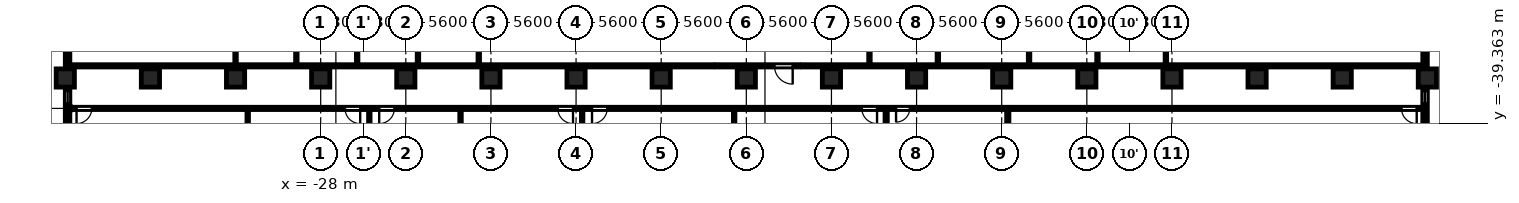
"""IFC4 building model, lengths in metres.
Left out: names, types, materials, properties, quantities, classifications, styles, units other than length and angle.
Written with IfcOpenShell. Run it as: python <this file> out.ifc"""

import sys

from ifc_helpers import new_model, si_unit, direction, frame, frame_2d, origin, origin_2d, place, context, subcontext, project, spatial, rectangle, circle, extrude, element, fill, save


model = new_model("IFC4")
c1 = context("Model", 3, precision=1e-05, world=origin(), true_north=direction((0.0, 1.0)))
c2 = subcontext(c1, "Body", "Model", "MODEL_VIEW")
j1 = project(units=[si_unit("LENGTHUNIT", "METRE"), si_unit("PLANEANGLEUNIT", "RADIAN")], contexts=[c1])
p1 = place(None, origin())
s1 = spatial("IfcSite", under=j1, at=p1, CompositionType="ELEMENT")
p2 = place(p1, origin())
s2 = spatial("IfcBuilding", under=s1, at=p2, CompositionType="ELEMENT")
p3 = place(p2, frame((0.0, 0.0, 6.5)))
s3 = spatial("IfcBuildingStorey", under=s2, at=p3, CompositionType="ELEMENT", Elevation=6.5)
for number, where, z_axis, x_axis in (
    (1, (-44.8, -36.4, 0.0), (0.0, 0.0, 1.0), (1.0, 0.0, 0.0)),
    (2, (-39.2, -36.4, 0.0), (0.0, 0.0, 1.0), (1.0, 0.0, 0.0)),
    (3, (-33.6, -36.4, 0.0), (0.0, 0.0, 1.0), (1.0, 0.0, 0.0)),
    (4, (-28.0, -36.4, 0.0), (0.0, 0.0, 1.0), (1.0, 0.0, 0.0)),
    (5, (-22.4, -36.4, 0.0), (0.0, 0.0, 1.0), (1.0, 0.0, 0.0)),
    (6, (-16.8, -36.4, 0.0), (0.0, 0.0, 1.0), (1.0, 0.0, 0.0)),
    (7, (-11.2, -36.4, 0.0), (0.0, 0.0, 1.0), (1.0, 0.0, 0.0)),
    (8, (-5.6, -36.4, 0.0), (0.0, 0.0, 1.0), (1.0, 0.0, 0.0)),
    (9, (0.0, -36.4, 0.0), (0.0, 0.0, 1.0), (1.0, 0.0, 0.0)),
    (10, (5.6, -36.4, 0.0), (0.0, 0.0, 1.0), (1.0, 0.0, 0.0)),
    (11, (11.2, -36.4, 0.0), (0.0, 0.0, 1.0), (1.0, 0.0, 0.0)),
    (12, (16.8, -36.4, 0.0), (0.0, 0.0, 1.0), (1.0, 0.0, 0.0)),
    (13, (22.4, -36.4, 0.0), (0.0, 0.0, 1.0), (1.0, 0.0, 0.0)),
    (14, (28.0, -36.4, 0.0), (0.0, 0.0, 1.0), (1.0, 0.0, 0.0)),
    (15, (33.6, -36.4, 0.0), (0.0, 0.0, 1.0), (1.0, 0.0, 0.0)),
    (16, (39.2, -36.4, 0.0), (0.0, 0.0, 1.0), (1.0, 0.0, 0.0)),
    (17, (44.8, -36.4, 0.0), (0.0, 0.0, 1.0), (1.0, 0.0, 0.0)),
):
    element("IfcColumn", number, at=place(p3, frame(where, z_axis=z_axis, x_axis=x_axis)), inside=s3, PredefinedType="COLUMN", context=c2, shape_type="SweptSolid", body=[
        extrude(circle(Radius=0.6, at=origin_2d()), origin(), (0.0, 0.0, 1.0), 4.8),
    ])
p4 = place(p3, frame((44.65, -42.8, 0.0), z_axis=(0.0, 0.0, 1.0), x_axis=(0.0, 1.0, 0.0)))
e18 = element("IfcWall", 18, at=p4, inside=s3, PredefinedType="SOLIDWALL", context=c2, shape_type="SweptSolid", body=[
    extrude(rectangle(XDim=5.8, YDim=0.3, at=frame_2d((2.9, 0.0))), origin(), (0.0, 0.0, 1.0), 3.65),
])
p5 = place(p4, frame((1.262, 0.0, 0.9)))
e19 = element("IfcOpeningElement", 19, at=p5, cuts=e18, PredefinedType="OPENING", context=c2, shape_type="SweptSolid", body=[
    extrude(rectangle(XDim=1.8, YDim=1.25, at=frame_2d((0.9, 0.625))), frame((0.0, 0.16, 0.0), z_axis=(0.0, -1.0, 0.0), x_axis=(1.0, 0.0, 0.0)), (0.0, 0.0, 1.0), 0.32),
])
p6 = place(p4, frame((4.738, 0.0, 0.6)))
e20 = element("IfcOpeningElement", 20, at=p6, cuts=e18, PredefinedType="OPENING", context=c2, shape_type="SweptSolid", body=[
    extrude(rectangle(XDim=0.8, YDim=1.55, at=frame_2d((0.4, 0.775))), frame((0.0, 0.16, 0.0), z_axis=(0.0, -1.0, 0.0), x_axis=(1.0, 0.0, 0.0)), (0.0, 0.0, 1.0), 0.32),
])
p7 = place(p3, frame((44.65, -35.8, 0.0), z_axis=(0.0, 0.0, 1.0), x_axis=(0.0, 1.0, 0.0)))
e21 = element("IfcWall", 21, at=p7, inside=s3, PredefinedType="SOLIDWALL", context=c2, shape_type="SweptSolid", body=[
    extrude(rectangle(XDim=5.8, YDim=0.3, at=frame_2d((2.9, 0.0))), origin(), (0.0, 0.0, 1.0), 3.65),
])
p8 = place(p7, frame((2.137, 0.0, 0.9)))
e22 = element("IfcOpeningElement", 22, at=p8, cuts=e21, PredefinedType="OPENING", context=c2, shape_type="SweptSolid", body=[
    extrude(rectangle(XDim=1.8, YDim=1.25, at=frame_2d((0.9, 0.625))), frame((0.0, 0.16, 0.0), z_axis=(0.0, -1.0, 0.0), x_axis=(1.0, 0.0, 0.0)), (0.0, 0.0, 1.0), 0.32),
])
p9 = place(p3, frame((-44.65, -30.0, 0.0), z_axis=(0.0, 0.0, 1.0), x_axis=(0.0, -1.0, 0.0)))
e23 = element("IfcWall", 23, at=p9, inside=s3, PredefinedType="SOLIDWALL", context=c2, shape_type="SweptSolid", body=[
    extrude(rectangle(XDim=5.8, YDim=0.3, at=frame_2d((2.9, 0.0))), origin(), (0.0, 0.0, 1.0), 3.65),
])
p10 = place(p9, frame((1.863, 0.0, 0.9)))
e24 = element("IfcOpeningElement", 24, at=p10, cuts=e23, PredefinedType="OPENING", context=c2, shape_type="SweptSolid", body=[
    extrude(rectangle(XDim=1.8, YDim=1.25, at=frame_2d((0.9, 0.625))), frame((0.0, 0.16, 0.0), z_axis=(0.0, -1.0, 0.0), x_axis=(1.0, 0.0, 0.0)), (0.0, 0.0, 1.0), 0.32),
])
p11 = place(p3, frame((-44.65, -37.0, 0.0), z_axis=(0.0, 0.0, 1.0), x_axis=(0.0, -1.0, 0.0)))
e25 = element("IfcWall", 25, at=p11, inside=s3, PredefinedType="SOLIDWALL", context=c2, shape_type="SweptSolid", body=[
    extrude(rectangle(XDim=5.8, YDim=0.3, at=frame_2d((2.9, 0.0))), origin(), (0.0, 0.0, 1.0), 3.65),
])
p12 = place(p11, frame((0.262, 0.0, 0.6)))
e26 = element("IfcOpeningElement", 26, at=p12, cuts=e25, PredefinedType="OPENING", context=c2, shape_type="SweptSolid", body=[
    extrude(rectangle(XDim=0.8, YDim=1.55, at=frame_2d((0.4, 0.775))), frame((0.0, 0.16, 0.0), z_axis=(0.0, -1.0, 0.0), x_axis=(1.0, 0.0, 0.0)), (0.0, 0.0, 1.0), 0.32),
])
p13 = place(p11, frame((2.738, 0.0, 0.9)))
e27 = element("IfcOpeningElement", 27, at=p13, cuts=e25, PredefinedType="OPENING", context=c2, shape_type="SweptSolid", body=[
    extrude(rectangle(XDim=1.8, YDim=1.25, at=frame_2d((0.9, 0.625))), frame((0.0, 0.16, 0.0), z_axis=(0.0, -1.0, 0.0), x_axis=(1.0, 0.0, 0.0)), (0.0, 0.0, 1.0), 0.32),
])
p14 = place(p3, frame((-44.48, -38.4, 0.0), z_axis=(0.0, 0.0, 1.0), x_axis=(1.0, 0.0, 0.0)))
e28 = element("IfcWall", 28, at=p14, inside=s3, PredefinedType="PARTITIONING", context=c2, shape_type="SweptSolid", body=[
    extrude(rectangle(XDim=88.96, YDim=0.15, at=frame_2d((44.48, 0.0))), origin(), (0.0, 0.0, 1.0), 4.45),
])
p15 = place(p14, frame((0.42, 0.0, 0.0)))
e29 = element("IfcOpeningElement", 29, at=p15, cuts=e28, PredefinedType="OPENING", context=c2, shape_type="SweptSolid", body=[
    extrude(rectangle(XDim=1.0, YDim=2.1, at=frame_2d((0.5, 1.05))), frame((0.0, 0.085, 0.0), z_axis=(0.0, -1.0, 0.0), x_axis=(1.0, 0.0, 0.0)), (0.0, 0.0, 1.0), 0.17),
])
p16 = place(p14, frame((18.08, 0.0, 0.0)))
e30 = element("IfcOpeningElement", 30, at=p16, cuts=e28, PredefinedType="OPENING", context=c2, shape_type="SweptSolid", body=[
    extrude(rectangle(XDim=1.0, YDim=2.1, at=frame_2d((0.5, 1.05))), frame((0.0, 0.085, 0.0), z_axis=(0.0, -1.0, 0.0), x_axis=(1.0, 0.0, 0.0)), (0.0, 0.0, 1.0), 0.17),
])
p17 = place(p14, frame((20.33, 0.0, 0.0)))
e31 = element("IfcOpeningElement", 31, at=p17, cuts=e28, PredefinedType="OPENING", context=c2, shape_type="SweptSolid", body=[
    extrude(rectangle(XDim=1.0, YDim=2.1, at=frame_2d((0.5, 1.05))), frame((0.0, 0.085, 0.0), z_axis=(0.0, -1.0, 0.0), x_axis=(1.0, 0.0, 0.0)), (0.0, 0.0, 1.0), 0.17),
])
p18 = place(p14, frame((32.08, 0.0, 0.0)))
e32 = element("IfcOpeningElement", 32, at=p18, cuts=e28, PredefinedType="OPENING", context=c2, shape_type="SweptSolid", body=[
    extrude(rectangle(XDim=1.0, YDim=2.1, at=frame_2d((0.5, 1.05))), frame((0.0, 0.085, 0.0), z_axis=(0.0, -1.0, 0.0), x_axis=(1.0, 0.0, 0.0)), (0.0, 0.0, 1.0), 0.17),
])
p19 = place(p14, frame((34.33, 0.0, 0.0)))
e33 = element("IfcOpeningElement", 33, at=p19, cuts=e28, PredefinedType="OPENING", context=c2, shape_type="SweptSolid", body=[
    extrude(rectangle(XDim=1.0, YDim=2.1, at=frame_2d((0.5, 1.05))), frame((0.0, 0.085, 0.0), z_axis=(0.0, -1.0, 0.0), x_axis=(1.0, 0.0, 0.0)), (0.0, 0.0, 1.0), 0.17),
])
p20 = place(p14, frame((52.08, 0.0, 0.0)))
e34 = element("IfcOpeningElement", 34, at=p20, cuts=e28, PredefinedType="OPENING", context=c2, shape_type="SweptSolid", body=[
    extrude(rectangle(XDim=1.0, YDim=2.1, at=frame_2d((0.5, 1.05))), frame((0.0, 0.085, 0.0), z_axis=(0.0, -1.0, 0.0), x_axis=(1.0, 0.0, 0.0)), (0.0, 0.0, 1.0), 0.17),
])
p21 = place(p14, frame((54.33, 0.0, 0.0)))
e35 = element("IfcOpeningElement", 35, at=p21, cuts=e28, PredefinedType="OPENING", context=c2, shape_type="SweptSolid", body=[
    extrude(rectangle(XDim=0.9, YDim=2.1, at=frame_2d((0.45, 1.05))), frame((0.0, 0.085, 0.0), z_axis=(0.0, -1.0, 0.0), x_axis=(1.0, 0.0, 0.0)), (0.0, 0.0, 1.0), 0.17),
])
p22 = place(p14, frame((87.58, 0.0, 0.0)))
e36 = element("IfcOpeningElement", 36, at=p22, cuts=e28, PredefinedType="OPENING", context=c2, shape_type="SweptSolid", body=[
    extrude(rectangle(XDim=1.0, YDim=2.1, at=frame_2d((0.5, 1.05))), frame((0.0, 0.085, 0.0), z_axis=(0.0, -1.0, 0.0), x_axis=(1.0, 0.0, 0.0)), (0.0, 0.0, 1.0), 0.17),
])
p23 = place(p3, frame((-44.48, -35.6, 0.0), z_axis=(0.0, 0.0, 1.0), x_axis=(1.0, 0.0, 0.0)))
e37 = element("IfcWall", 37, at=p23, inside=s3, PredefinedType="PARTITIONING", context=c2, shape_type="SweptSolid", body=[
    extrude(rectangle(XDim=42.38, YDim=0.15, at=frame_2d((21.19, 0.0))), origin(), (0.0, 0.0, 1.0), 4.45),
])
p24 = place(p3, frame((-2.05, -35.6, 0.0), z_axis=(0.0, 0.0, 1.0), x_axis=(1.0, 0.0, 0.0)))
e38 = element("IfcWall", 38, at=p24, inside=s3, PredefinedType="PARTITIONING", context=c2, shape_type="SweptSolid", body=[
    extrude(rectangle(XDim=5.6, YDim=0.15, at=frame_2d((2.8, 0.0))), origin(), (0.0, 0.0, 1.0), 4.45),
])
p25 = place(p24, frame((3.9, 0.0, 0.0)))
e39 = element("IfcOpeningElement", 39, at=p25, cuts=e38, PredefinedType="OPENING", context=c2, shape_type="SweptSolid", body=[
    extrude(rectangle(XDim=1.2, YDim=2.1, at=frame_2d((0.6, 1.05))), frame((0.0, 0.085, 0.0), z_axis=(0.0, -1.0, 0.0), x_axis=(1.0, 0.0, 0.0)), (0.0, 0.0, 1.0), 0.17),
])
p26 = place(p3, frame((3.6, -35.6, 0.0), z_axis=(0.0, 0.0, 1.0), x_axis=(1.0, 0.0, 0.0)))
e40 = element("IfcWall", 40, at=p26, inside=s3, PredefinedType="PARTITIONING", context=c2, shape_type="SweptSolid", body=[
    extrude(rectangle(XDim=40.88, YDim=0.15, at=frame_2d((20.44, 0.0))), origin(), (0.0, 0.0, 1.0), 4.45),
])
p27 = place(p3, frame((-33.6, -35.525, 0.0), z_axis=(0.0, 0.0, 1.0), x_axis=(0.0, 1.0, 0.0)))
e41 = element("IfcWall", 41, at=p27, inside=s3, PredefinedType="PARTITIONING", context=c2, shape_type="SweptSolid", body=[
    extrude(rectangle(XDim=10.65, YDim=0.1, at=frame_2d((5.325, 0.0))), origin(), (0.0, 0.0, 1.0), 4.45),
])
p28 = place(p3, frame((-32.8, -57.08, 0.0), z_axis=(0.0, 0.0, 1.0), x_axis=(0.0, 1.0, 0.0)))
e42 = element("IfcWall", 42, at=p28, inside=s3, PredefinedType="PARTITIONING", context=c2, shape_type="SweptSolid", body=[
    extrude(rectangle(XDim=18.605, YDim=0.1, at=frame_2d((9.302, 0.0))), origin(), (0.0, 0.0, 1.0), 4.45),
])
for number, where, z_axis, x_axis in (
    (43, (-29.6, -35.525, 0.0), (0.0, 0.0, 1.0), (0.0, 1.0, 0.0)),
    (44, (-25.6, -35.525, 0.0), (0.0, 0.0, 1.0), (0.0, 1.0, 0.0)),
):
    element("IfcWall", number, at=place(p3, frame(where, z_axis=z_axis, x_axis=x_axis)), inside=s3, PredefinedType="PARTITIONING", context=c2, shape_type="SweptSolid", body=[
        extrude(rectangle(XDim=10.65, YDim=0.1, at=frame_2d((5.325, 0.0))), origin(), (0.0, 0.0, 1.0), 4.45),
    ])
p29 = place(p3, frame((-24.8, -57.08, 0.0), z_axis=(0.0, 0.0, 1.0), x_axis=(0.0, 1.0, 0.0)))
e45 = element("IfcWall", 45, at=p29, inside=s3, PredefinedType="PARTITIONING", context=c2, shape_type="SweptSolid", body=[
    extrude(rectangle(XDim=18.605, YDim=0.1, at=frame_2d((9.302, 0.0))), origin(), (0.0, 0.0, 1.0), 4.45),
])
p30 = place(p3, frame((-21.6, -35.525, 0.0), z_axis=(0.0, 0.0, 1.0), x_axis=(0.0, 1.0, 0.0)))
e46 = element("IfcWall", 46, at=p30, inside=s3, PredefinedType="PARTITIONING", context=c2, shape_type="SweptSolid", body=[
    extrude(rectangle(XDim=10.65, YDim=0.1, at=frame_2d((5.325, 0.0))), origin(), (0.0, 0.0, 1.0), 4.45),
])
p31 = place(p3, frame((-18.8, -57.08, 0.0), z_axis=(0.0, 0.0, 1.0), x_axis=(0.0, 1.0, 0.0)))
e47 = element("IfcWall", 47, at=p31, inside=s3, PredefinedType="PARTITIONING", context=c2, shape_type="SweptSolid", body=[
    extrude(rectangle(XDim=18.605, YDim=0.1, at=frame_2d((9.302, 0.0))), origin(), (0.0, 0.0, 1.0), 4.45),
])
p32 = place(p3, frame((-17.6, -35.525, 0.0), z_axis=(0.0, 0.0, 1.0), x_axis=(0.0, 1.0, 0.0)))
e48 = element("IfcWall", 48, at=p32, inside=s3, PredefinedType="PARTITIONING", context=c2, shape_type="SweptSolid", body=[
    extrude(rectangle(XDim=10.65, YDim=0.1, at=frame_2d((5.325, 0.0))), origin(), (0.0, 0.0, 1.0), 4.45),
])
p33 = place(p3, frame((-10.8, -58.23, 0.0), z_axis=(0.0, 0.0, 1.0), x_axis=(0.0, 1.0, 0.0)))
e49 = element("IfcWall", 49, at=p33, inside=s3, PredefinedType="PARTITIONING", context=c2, shape_type="SweptSolid", body=[
    extrude(rectangle(XDim=19.755, YDim=0.1, at=frame_2d((9.877, 0.0))), origin(), (0.0, 0.0, 1.0), 4.45),
])
p34 = place(p3, frame((-0.8, -57.08, 0.0), z_axis=(0.0, 0.0, 1.0), x_axis=(0.0, 1.0, 0.0)))
e50 = element("IfcWall", 50, at=p34, inside=s3, PredefinedType="PARTITIONING", context=c2, shape_type="SweptSolid", body=[
    extrude(rectangle(XDim=18.605, YDim=0.1, at=frame_2d((9.302, 0.0))), origin(), (0.0, 0.0, 1.0), 4.45),
])
p35 = place(p3, frame((8.1, -35.525, 0.0), z_axis=(0.0, 0.0, 1.0), x_axis=(0.0, 1.0, 0.0)))
e51 = element("IfcWall", 51, at=p35, inside=s3, PredefinedType="PARTITIONING", context=c2, shape_type="SweptSolid", body=[
    extrude(rectangle(XDim=10.65, YDim=0.1, at=frame_2d((5.325, 0.0))), origin(), (0.0, 0.0, 1.0), 4.45),
])
p36 = place(p3, frame((9.2, -57.08, 0.0), z_axis=(0.0, 0.0, 1.0), x_axis=(0.0, 1.0, 0.0)))
e52 = element("IfcWall", 52, at=p36, inside=s3, PredefinedType="PARTITIONING", context=c2, shape_type="SweptSolid", body=[
    extrude(rectangle(XDim=18.605, YDim=0.15, at=frame_2d((9.302, 0.0))), origin(), (0.0, 0.0, 1.0), 4.45),
])
p37 = place(p3, frame((12.6, -35.525, 0.0), z_axis=(0.0, 0.0, 1.0), x_axis=(0.0, 1.0, 0.0)))
e53 = element("IfcWall", 53, at=p37, inside=s3, PredefinedType="PARTITIONING", context=c2, shape_type="SweptSolid", body=[
    extrude(rectangle(XDim=10.65, YDim=0.1, at=frame_2d((5.325, 0.0))), origin(), (0.0, 0.0, 1.0), 4.45),
])
p38 = place(p3, frame((17.2, -58.23, 0.0), z_axis=(0.0, 0.0, 1.0), x_axis=(0.0, 1.0, 0.0)))
e54 = element("IfcWall", 54, at=p38, inside=s3, PredefinedType="PARTITIONING", context=c2, shape_type="SweptSolid", body=[
    extrude(rectangle(XDim=19.755, YDim=0.15, at=frame_2d((9.877, 0.0))), origin(), (0.0, 0.0, 1.0), 4.45),
])
for number, where, z_axis, x_axis in (
    (55, (18.6, -35.525, 0.0), (0.0, 0.0, 1.0), (0.0, 1.0, 0.0)),
    (56, (23.1, -35.525, 0.0), (0.0, 0.0, 1.0), (0.0, 1.0, 0.0)),
    (57, (27.6, -35.525, 0.0), (0.0, 0.0, 1.0), (0.0, 1.0, 0.0)),
):
    element("IfcWall", number, at=place(p3, frame(where, z_axis=z_axis, x_axis=x_axis)), inside=s3, PredefinedType="PARTITIONING", context=c2, shape_type="SweptSolid", body=[
        extrude(rectangle(XDim=10.65, YDim=0.1, at=frame_2d((5.325, 0.0))), origin(), (0.0, 0.0, 1.0), 4.45),
    ])
p39 = place(p25, origin())
e58 = element("IfcDoor", 58, at=p39, inside=s3, OperationType="SINGLE_SWING_RIGHT", PredefinedType="DOOR", context=c2, shape_type="SweptSolid", body=[
    extrude(rectangle(XDim=1.2, YDim=2.1, at=frame_2d((0.6, 1.05))), frame((0.0, 0.025, 0.0), z_axis=(0.0, -1.0, 0.0), x_axis=(1.0, 0.0, 0.0)), (0.0, 0.0, 1.0), 0.05),
])
fill(e39, e58)
p40 = place(p15, origin())
e59 = element("IfcDoor", 59, at=p40, inside=s3, OperationType="SINGLE_SWING_LEFT", PredefinedType="DOOR", context=c2, shape_type="SweptSolid", body=[
    extrude(rectangle(XDim=1.0, YDim=2.1, at=frame_2d((0.5, 1.05))), frame((0.0, 0.025, 0.0), z_axis=(0.0, -1.0, 0.0), x_axis=(1.0, 0.0, 0.0)), (0.0, 0.0, 1.0), 0.05),
])
fill(e29, e59)
p41 = place(p16, origin())
e60 = element("IfcDoor", 60, at=p41, inside=s3, OperationType="SINGLE_SWING_RIGHT", PredefinedType="DOOR", context=c2, shape_type="SweptSolid", body=[
    extrude(rectangle(XDim=1.0, YDim=2.1, at=frame_2d((0.5, 1.05))), frame((0.0, 0.025, 0.0), z_axis=(0.0, -1.0, 0.0), x_axis=(1.0, 0.0, 0.0)), (0.0, 0.0, 1.0), 0.05),
])
fill(e30, e60)
p42 = place(p17, origin())
e61 = element("IfcDoor", 61, at=p42, inside=s3, OperationType="SINGLE_SWING_LEFT", PredefinedType="DOOR", context=c2, shape_type="SweptSolid", body=[
    extrude(rectangle(XDim=1.0, YDim=2.1, at=frame_2d((0.5, 1.05))), frame((0.0, 0.025, 0.0), z_axis=(0.0, -1.0, 0.0), x_axis=(1.0, 0.0, 0.0)), (0.0, 0.0, 1.0), 0.05),
])
fill(e31, e61)
p43 = place(p18, origin())
e62 = element("IfcDoor", 62, at=p43, inside=s3, OperationType="SINGLE_SWING_RIGHT", PredefinedType="DOOR", context=c2, shape_type="SweptSolid", body=[
    extrude(rectangle(XDim=1.0, YDim=2.1, at=frame_2d((0.5, 1.05))), frame((0.0, 0.025, 0.0), z_axis=(0.0, -1.0, 0.0), x_axis=(1.0, 0.0, 0.0)), (0.0, 0.0, 1.0), 0.05),
])
fill(e32, e62)
p44 = place(p19, origin())
e63 = element("IfcDoor", 63, at=p44, inside=s3, OperationType="SINGLE_SWING_LEFT", PredefinedType="DOOR", context=c2, shape_type="SweptSolid", body=[
    extrude(rectangle(XDim=1.0, YDim=2.1, at=frame_2d((0.5, 1.05))), frame((0.0, 0.025, 0.0), z_axis=(0.0, -1.0, 0.0), x_axis=(1.0, 0.0, 0.0)), (0.0, 0.0, 1.0), 0.05),
])
fill(e33, e63)
p45 = place(p20, origin())
e64 = element("IfcDoor", 64, at=p45, inside=s3, OperationType="SINGLE_SWING_RIGHT", PredefinedType="DOOR", context=c2, shape_type="SweptSolid", body=[
    extrude(rectangle(XDim=1.0, YDim=2.1, at=frame_2d((0.5, 1.05))), frame((0.0, 0.025, 0.0), z_axis=(0.0, -1.0, 0.0), x_axis=(1.0, 0.0, 0.0)), (0.0, 0.0, 1.0), 0.05),
])
fill(e34, e64)
p46 = place(p21, origin())
e65 = element("IfcDoor", 65, at=p46, inside=s3, OperationType="SINGLE_SWING_LEFT", PredefinedType="DOOR", context=c2, shape_type="SweptSolid", body=[
    extrude(rectangle(XDim=0.9, YDim=2.1, at=frame_2d((0.45, 1.05))), frame((0.0, 0.025, 0.0), z_axis=(0.0, -1.0, 0.0), x_axis=(1.0, 0.0, 0.0)), (0.0, 0.0, 1.0), 0.05),
])
fill(e35, e65)
p47 = place(p22, origin())
e66 = element("IfcDoor", 66, at=p47, inside=s3, OperationType="SINGLE_SWING_RIGHT", PredefinedType="DOOR", context=c2, shape_type="SweptSolid", body=[
    extrude(rectangle(XDim=1.0, YDim=2.1, at=frame_2d((0.5, 1.05))), frame((0.0, 0.025, 0.0), z_axis=(0.0, -1.0, 0.0), x_axis=(1.0, 0.0, 0.0)), (0.0, 0.0, 1.0), 0.05),
])
fill(e36, e66)
p48 = place(p6, origin())
e67 = element("IfcWindow", 67, at=p48, inside=s3, PartitioningType="SINGLE_PANEL", PredefinedType="WINDOW", context=c2, shape_type="SweptSolid", body=[
    extrude(rectangle(XDim=0.8, YDim=1.55, at=frame_2d((0.4, 0.775))), frame((0.0, 0.03, 0.0), z_axis=(0.0, -1.0, 0.0), x_axis=(1.0, 0.0, 0.0)), (0.0, 0.0, 1.0), 0.06),
])
fill(e20, e67)
p49 = place(p12, origin())
e68 = element("IfcWindow", 68, at=p49, inside=s3, PartitioningType="SINGLE_PANEL", PredefinedType="WINDOW", context=c2, shape_type="SweptSolid", body=[
    extrude(rectangle(XDim=0.8, YDim=1.55, at=frame_2d((0.4, 0.775))), frame((0.0, 0.03, 0.0), z_axis=(0.0, -1.0, 0.0), x_axis=(1.0, 0.0, 0.0)), (0.0, 0.0, 1.0), 0.06),
])
fill(e26, e68)
save(model, sys.argv[1])
